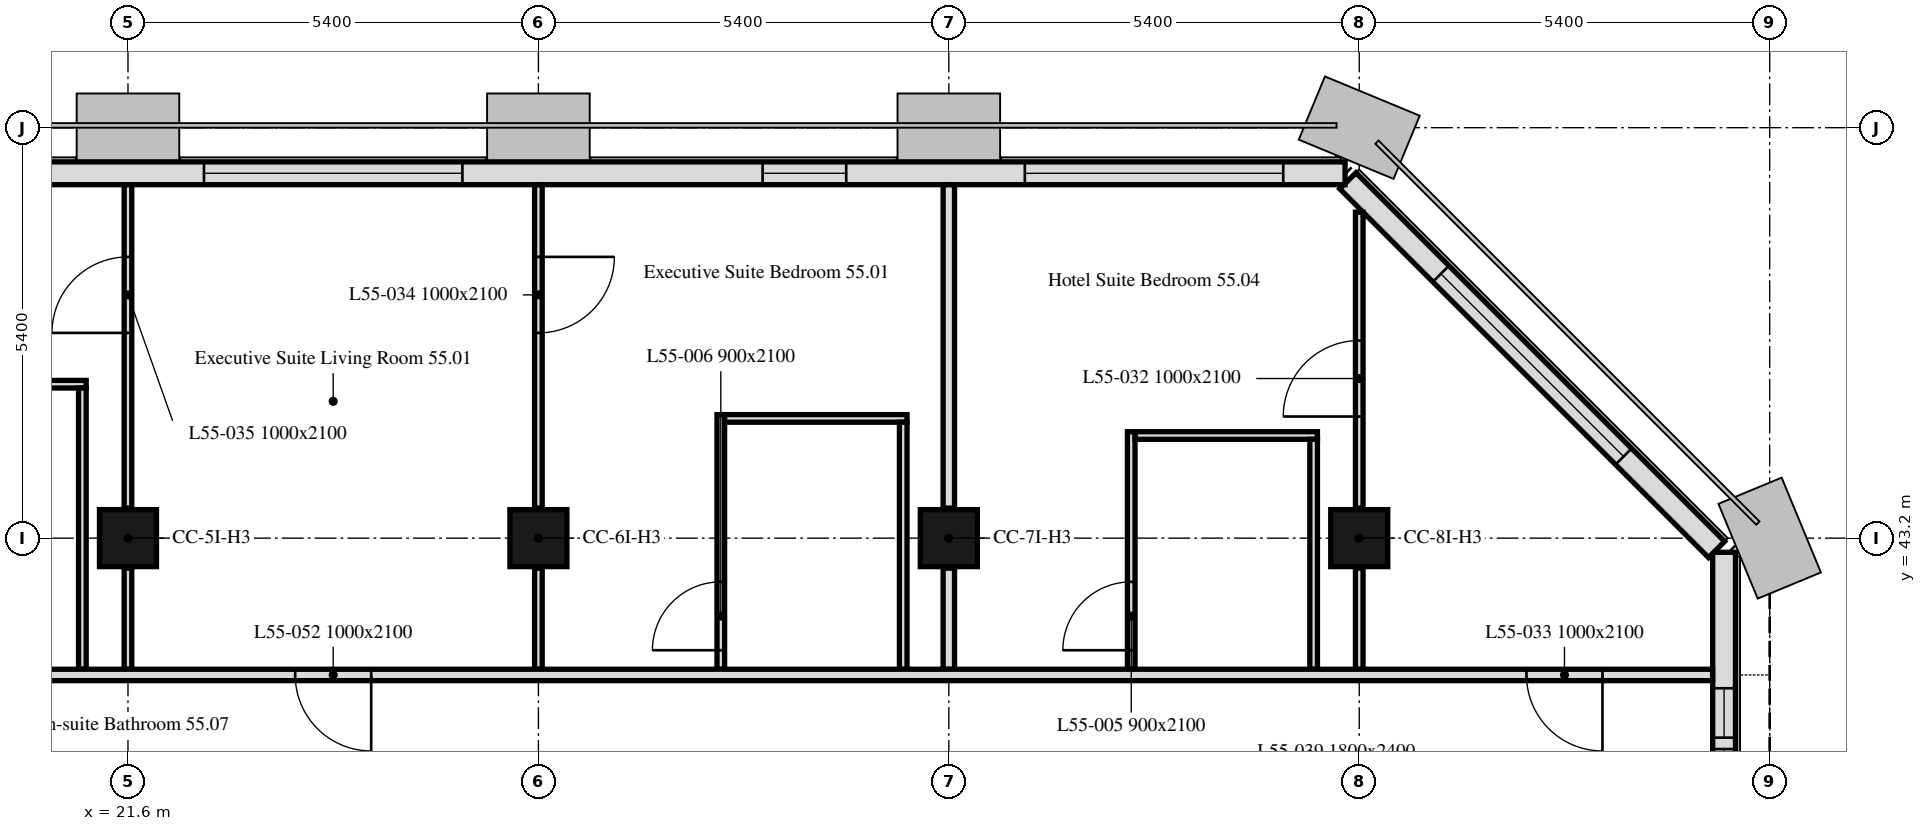
"""IFC4 building model, lengths in metres.
Left out: names, types, materials, properties, quantities, classifications, styles, units other than length and angle.
Written with IfcOpenShell. Run it as: python <this file> out.ifc"""

import sys

from ifc_helpers import new_model, si_unit, direction, frame, frame_2d, origin, origin_2d, place, context, subcontext, project, spatial, rectangle, extrude, element, fill, save


model = new_model("IFC4")
c1 = context("Model", 3, precision=1e-05, world=origin(), true_north=direction((0.0, 1.0)))
c2 = subcontext(c1, "Body", "Model", "MODEL_VIEW")
j1 = project(units=[si_unit("LENGTHUNIT", "METRE"), si_unit("PLANEANGLEUNIT", "RADIAN")], contexts=[c1])
p1 = place(None, origin())
s1 = spatial("IfcSite", under=j1, at=p1, CompositionType="ELEMENT")
p2 = place(p1, origin())
s2 = spatial("IfcBuilding", under=s1, at=p2, CompositionType="ELEMENT")
p3 = place(p2, frame((0.0, 0.0, 220.3)))
s3 = spatial("IfcBuildingStorey", under=s2, at=p3, CompositionType="ELEMENT", Elevation=220.3)
for number, where, z_axis, x_axis in (
    (1, (21.6, 43.2, 0.0), (0.0, 0.0, 1.0), (1.0, 0.0, 0.0)),
    (2, (27.0, 43.2, 0.0), (0.0, 0.0, 1.0), (1.0, 0.0, 0.0)),
    (3, (32.4, 43.2, 0.0), (0.0, 0.0, 1.0), (1.0, 0.0, 0.0)),
    (4, (37.8, 43.2, 0.0), (0.0, 0.0, 1.0), (1.0, 0.0, 0.0)),
):
    element("IfcColumn", number, at=place(p3, frame(where, z_axis=z_axis, x_axis=x_axis)), inside=s3, PredefinedType="COLUMN", context=c2, shape_type="SweptSolid", body=[
        extrude(rectangle(XDim=0.75, YDim=0.75, at=origin_2d()), origin(), (0.0, 0.0, 1.0), 3.0),
    ])
p4 = place(p3, frame((42.6, 32.4, 0.0), z_axis=(0.0, 0.0, 1.0), x_axis=(0.0, 1.0, 0.0)))
e5 = element("IfcWall", 5, at=p4, inside=s3, PredefinedType="SOLIDWALL", context=c2, shape_type="SweptSolid", body=[
    extrude(rectangle(XDim=10.614, YDim=0.3, at=frame_2d((5.307, 0.0))), origin(), (0.0, 0.0, 1.0), 3.0),
])
p5 = place(p4, frame((1.0, 0.0, 0.9)))
e6 = element("IfcOpeningElement", 6, at=p5, cuts=e5, PredefinedType="OPENING", context=c2, shape_type="SweptSolid", body=[
    extrude(rectangle(XDim=3.4, YDim=1.7, at=frame_2d((1.7, 0.85))), frame((0.0, 0.16, 0.0), z_axis=(0.0, -1.0, 0.0), x_axis=(1.0, 0.0, 0.0)), (0.0, 0.0, 1.0), 0.32),
])
p6 = place(p4, frame((7.375, 0.0, 0.9)))
e7 = element("IfcOpeningElement", 7, at=p6, cuts=e5, PredefinedType="OPENING", context=c2, shape_type="SweptSolid", body=[
    extrude(rectangle(XDim=0.65, YDim=1.7, at=frame_2d((0.325, 0.85))), frame((0.0, 0.16, 0.0), z_axis=(0.0, -1.0, 0.0), x_axis=(1.0, 0.0, 0.0)), (0.0, 0.0, 1.0), 0.32),
])
p7 = place(p4, frame((8.175, 0.0, 0.9)))
e8 = element("IfcOpeningElement", 8, at=p7, cuts=e5, PredefinedType="OPENING", context=c2, shape_type="SweptSolid", body=[
    extrude(rectangle(XDim=0.65, YDim=1.7, at=frame_2d((0.325, 0.85))), frame((0.0, 0.16, 0.0), z_axis=(0.0, -1.0, 0.0), x_axis=(1.0, 0.0, 0.0)), (0.0, 0.0, 1.0), 0.32),
])
p8 = place(p3, frame((42.501, 43.051, 0.0), z_axis=(0.0, 0.0, 1.0), x_axis=(-0.707106781187, 0.707106781187, 0.0)))
e9 = element("IfcWall", 9, at=p8, inside=s3, PredefinedType="SOLIDWALL", context=c2, shape_type="SweptSolid", body=[
    extrude(rectangle(XDim=6.86, YDim=0.3, at=frame_2d((3.43, 0.0))), origin(), (0.0, 0.0, 1.0), 3.0),
])
p9 = place(p8, frame((1.73, 0.0, 0.9)))
e10 = element("IfcOpeningElement", 10, at=p9, cuts=e9, PredefinedType="OPENING", context=c2, shape_type="SweptSolid", body=[
    extrude(rectangle(XDim=3.4, YDim=1.7, at=frame_2d((1.7, 0.85))), frame((0.0, 0.16, 0.0), z_axis=(0.0, -1.0, 0.0), x_axis=(1.0, 0.0, 0.0)), (0.0, 0.0, 1.0), 0.32),
])
p10 = place(p3, frame((37.614, 48.0, 0.0), z_axis=(0.0, 0.0, 1.0), x_axis=(-1.0, 0.0, 0.0)))
e11 = element("IfcWall", 11, at=p10, inside=s3, PredefinedType="SOLIDWALL", context=c2, shape_type="SweptSolid", body=[
    extrude(rectangle(XDim=32.027, YDim=0.3, at=frame_2d((16.014, 0.0))), origin(), (0.0, 0.0, 1.0), 3.0),
])
p11 = place(p10, frame((0.814, 0.0, 0.9)))
e12 = element("IfcOpeningElement", 12, at=p11, cuts=e11, PredefinedType="OPENING", context=c2, shape_type="SweptSolid", body=[
    extrude(rectangle(XDim=3.4, YDim=1.7, at=frame_2d((1.7, 0.85))), frame((0.0, 0.16, 0.0), z_axis=(0.0, -1.0, 0.0), x_axis=(1.0, 0.0, 0.0)), (0.0, 0.0, 1.0), 0.32),
])
p12 = place(p10, frame((6.564, 0.0, 0.9)))
e13 = element("IfcOpeningElement", 13, at=p12, cuts=e11, PredefinedType="OPENING", context=c2, shape_type="SweptSolid", body=[
    extrude(rectangle(XDim=1.1, YDim=1.7, at=frame_2d((0.55, 0.85))), frame((0.0, 0.16, 0.0), z_axis=(0.0, -1.0, 0.0), x_axis=(1.0, 0.0, 0.0)), (0.0, 0.0, 1.0), 0.32),
])
p13 = place(p10, frame((11.614, 0.0, 0.9)))
e14 = element("IfcOpeningElement", 14, at=p13, cuts=e11, PredefinedType="OPENING", context=c2, shape_type="SweptSolid", body=[
    extrude(rectangle(XDim=3.4, YDim=1.7, at=frame_2d((1.7, 0.85))), frame((0.0, 0.16, 0.0), z_axis=(0.0, -1.0, 0.0), x_axis=(1.0, 0.0, 0.0)), (0.0, 0.0, 1.0), 0.32),
])
p14 = place(p10, frame((17.364, 0.0, 0.9)))
e15 = element("IfcOpeningElement", 15, at=p14, cuts=e11, PredefinedType="OPENING", context=c2, shape_type="SweptSolid", body=[
    extrude(rectangle(XDim=1.1, YDim=1.7, at=frame_2d((0.55, 0.85))), frame((0.0, 0.16, 0.0), z_axis=(0.0, -1.0, 0.0), x_axis=(1.0, 0.0, 0.0)), (0.0, 0.0, 1.0), 0.32),
])
p15 = place(p10, frame((22.414, 0.0, 0.9)))
e16 = element("IfcOpeningElement", 16, at=p15, cuts=e11, PredefinedType="OPENING", context=c2, shape_type="SweptSolid", body=[
    extrude(rectangle(XDim=3.4, YDim=1.7, at=frame_2d((1.7, 0.85))), frame((0.0, 0.16, 0.0), z_axis=(0.0, -1.0, 0.0), x_axis=(1.0, 0.0, 0.0)), (0.0, 0.0, 1.0), 0.32),
])
p16 = place(p10, frame((28.164, 0.0, 0.9)))
e17 = element("IfcOpeningElement", 17, at=p16, cuts=e11, PredefinedType="OPENING", context=c2, shape_type="SweptSolid", body=[
    extrude(rectangle(XDim=1.1, YDim=1.7, at=frame_2d((0.55, 0.85))), frame((0.0, 0.16, 0.0), z_axis=(0.0, -1.0, 0.0), x_axis=(1.0, 0.0, 0.0)), (0.0, 0.0, 1.0), 0.32),
])
p17 = place(p3, frame((32.4, 47.849, 0.0), z_axis=(0.0, 0.0, 1.0), x_axis=(0.0, -1.0, 0.0)))
e18 = element("IfcWall", 18, at=p17, inside=s3, PredefinedType="PARTITIONING", context=c2, shape_type="SweptSolid", body=[
    extrude(rectangle(XDim=4.254, YDim=0.15, at=frame_2d((2.127, 0.0))), origin(), (0.0, 0.0, 1.0), 2.4),
])
p18 = place(p3, frame((32.4, 42.805, 0.0), z_axis=(0.0, 0.0, 1.0), x_axis=(0.0, -1.0, 0.0)))
e19 = element("IfcWall", 19, at=p18, inside=s3, PredefinedType="PARTITIONING", context=c2, shape_type="SweptSolid", body=[
    extrude(rectangle(XDim=1.33, YDim=0.15, at=frame_2d((0.665, 0.0))), origin(), (0.0, 0.0, 1.0), 2.4),
])
p19 = place(p3, frame((34.8, 41.475, 0.0), z_axis=(0.0, 0.0, 1.0), x_axis=(0.0, 1.0, 0.0)))
e20 = element("IfcWall", 20, at=p19, inside=s3, PredefinedType="PARTITIONING", context=c2, shape_type="SweptSolid", body=[
    extrude(rectangle(XDim=3.125, YDim=0.1, at=frame_2d((1.562, 0.0))), origin(), (0.0, 0.0, 1.0), 3.0),
])
p20 = place(p19, frame((0.25, 0.0, 0.0)))
e21 = element("IfcOpeningElement", 21, at=p20, cuts=e20, PredefinedType="OPENING", context=c2, shape_type="SweptSolid", body=[
    extrude(rectangle(XDim=0.9, YDim=2.1, at=frame_2d((0.45, 1.05))), frame((0.0, 0.05, 0.0), z_axis=(0.0, -1.0, 0.0), x_axis=(1.0, 0.0, 0.0)), (0.0, 0.0, 1.0), 0.1),
])
p21 = place(p3, frame((34.85, 44.55, 0.0), z_axis=(0.0, 0.0, 1.0), x_axis=(1.0, 0.0, 0.0)))
e22 = element("IfcWall", 22, at=p21, inside=s3, PredefinedType="PARTITIONING", context=c2, shape_type="SweptSolid", body=[
    extrude(rectangle(XDim=2.4, YDim=0.1, at=frame_2d((1.2, 0.0))), origin(), (0.0, 0.0, 1.0), 3.0),
])
p22 = place(p3, frame((37.2, 44.5, 0.0), z_axis=(0.0, 0.0, 1.0), x_axis=(0.0, -1.0, 0.0)))
e23 = element("IfcWall", 23, at=p22, inside=s3, PredefinedType="PARTITIONING", context=c2, shape_type="SweptSolid", body=[
    extrude(rectangle(XDim=3.025, YDim=0.1, at=frame_2d((1.512, 0.0))), origin(), (0.0, 0.0, 1.0), 3.0),
])
p23 = place(p3, frame((37.8, 41.475, 0.0), z_axis=(0.0, 0.0, 1.0), x_axis=(0.0, 1.0, 0.0)))
e24 = element("IfcWall", 24, at=p23, inside=s3, PredefinedType="PARTITIONING", context=c2, shape_type="SweptSolid", body=[
    extrude(rectangle(XDim=1.33, YDim=0.1, at=frame_2d((0.665, 0.0))), origin(), (0.0, 0.0, 1.0), 3.0),
])
p24 = place(p3, frame((37.8, 43.595, 0.0), z_axis=(0.0, 0.0, 1.0), x_axis=(0.0, 1.0, 0.0)))
e25 = element("IfcWall", 25, at=p24, inside=s3, PredefinedType="PARTITIONING", context=c2, shape_type="SweptSolid", body=[
    extrude(rectangle(XDim=3.893, YDim=0.1, at=frame_2d((1.946, 0.0))), origin(), (0.0, 0.0, 1.0), 3.0),
])
p25 = place(p24, frame((1.205, 0.0, 0.0)))
e26 = element("IfcOpeningElement", 26, at=p25, cuts=e25, PredefinedType="OPENING", context=c2, shape_type="SweptSolid", body=[
    extrude(rectangle(XDim=1.0, YDim=2.1, at=frame_2d((0.5, 1.05))), frame((0.0, 0.05, 0.0), z_axis=(0.0, -1.0, 0.0), x_axis=(1.0, 0.0, 0.0)), (0.0, 0.0, 1.0), 0.1),
])
p26 = place(p3, frame((27.0, 47.849, 0.0), z_axis=(0.0, 0.0, 1.0), x_axis=(0.0, -1.0, 0.0)))
e27 = element("IfcWall", 27, at=p26, inside=s3, PredefinedType="PARTITIONING", context=c2, shape_type="SweptSolid", body=[
    extrude(rectangle(XDim=4.254, YDim=0.1, at=frame_2d((2.127, 0.0))), origin(), (0.0, 0.0, 1.0), 2.4),
])
p27 = place(p26, frame((0.949, 0.0, 0.0)))
e28 = element("IfcOpeningElement", 28, at=p27, cuts=e27, PredefinedType="OPENING", context=c2, shape_type="SweptSolid", body=[
    extrude(rectangle(XDim=1.0, YDim=2.1, at=frame_2d((0.5, 1.05))), frame((0.0, 0.05, 0.0), z_axis=(0.0, -1.0, 0.0), x_axis=(1.0, 0.0, 0.0)), (0.0, 0.0, 1.0), 0.1),
])
p28 = place(p3, frame((27.0, 42.805, 0.0), z_axis=(0.0, 0.0, 1.0), x_axis=(0.0, -1.0, 0.0)))
e29 = element("IfcWall", 29, at=p28, inside=s3, PredefinedType="PARTITIONING", context=c2, shape_type="SweptSolid", body=[
    extrude(rectangle(XDim=1.33, YDim=0.1, at=frame_2d((0.665, 0.0))), origin(), (0.0, 0.0, 1.0), 2.4),
])
p29 = place(p3, frame((29.4, 41.475, 0.0), z_axis=(0.0, 0.0, 1.0), x_axis=(0.0, 1.0, 0.0)))
e30 = element("IfcWall", 30, at=p29, inside=s3, PredefinedType="PARTITIONING", context=c2, shape_type="SweptSolid", body=[
    extrude(rectangle(XDim=3.35, YDim=0.1, at=frame_2d((1.675, 0.0))), origin(), (0.0, 0.0, 1.0), 3.0),
])
p30 = place(p29, frame((0.25, 0.0, 0.0)))
e31 = element("IfcOpeningElement", 31, at=p30, cuts=e30, PredefinedType="OPENING", context=c2, shape_type="SweptSolid", body=[
    extrude(rectangle(XDim=0.9, YDim=2.1, at=frame_2d((0.45, 1.05))), frame((0.0, 0.05, 0.0), z_axis=(0.0, -1.0, 0.0), x_axis=(1.0, 0.0, 0.0)), (0.0, 0.0, 1.0), 0.1),
])
p31 = place(p3, frame((29.45, 44.775, 0.0), z_axis=(0.0, 0.0, 1.0), x_axis=(1.0, 0.0, 0.0)))
e32 = element("IfcWall", 32, at=p31, inside=s3, PredefinedType="PARTITIONING", context=c2, shape_type="SweptSolid", body=[
    extrude(rectangle(XDim=2.4, YDim=0.1, at=frame_2d((1.2, 0.0))), origin(), (0.0, 0.0, 1.0), 3.0),
])
p32 = place(p3, frame((31.8, 44.725, 0.0), z_axis=(0.0, 0.0, 1.0), x_axis=(0.0, -1.0, 0.0)))
e33 = element("IfcWall", 33, at=p32, inside=s3, PredefinedType="PARTITIONING", context=c2, shape_type="SweptSolid", body=[
    extrude(rectangle(XDim=3.25, YDim=0.1, at=frame_2d((1.625, 0.0))), origin(), (0.0, 0.0, 1.0), 3.0),
])
p33 = place(p3, frame((18.65, 45.225, 0.0), z_axis=(0.0, 0.0, 1.0), x_axis=(1.0, 0.0, 0.0)))
e34 = element("IfcWall", 34, at=p33, inside=s3, PredefinedType="PARTITIONING", context=c2, shape_type="SweptSolid", body=[
    extrude(rectangle(XDim=2.4, YDim=0.1, at=frame_2d((1.2, 0.0))), origin(), (0.0, 0.0, 1.0), 3.0),
])
p34 = place(p3, frame((21.0, 45.175, 0.0), z_axis=(0.0, 0.0, 1.0), x_axis=(0.0, -1.0, 0.0)))
e35 = element("IfcWall", 35, at=p34, inside=s3, PredefinedType="PARTITIONING", context=c2, shape_type="SweptSolid", body=[
    extrude(rectangle(XDim=3.7, YDim=0.1, at=frame_2d((1.85, 0.0))), origin(), (0.0, 0.0, 1.0), 3.0),
])
p35 = place(p3, frame((21.6, 41.475, 0.0), z_axis=(0.0, 0.0, 1.0), x_axis=(0.0, 1.0, 0.0)))
e36 = element("IfcWall", 36, at=p35, inside=s3, PredefinedType="PARTITIONING", context=c2, shape_type="SweptSolid", body=[
    extrude(rectangle(XDim=1.33, YDim=0.1, at=frame_2d((0.665, 0.0))), origin(), (0.0, 0.0, 1.0), 2.4),
])
p36 = place(p3, frame((21.6, 43.595, 0.0), z_axis=(0.0, 0.0, 1.0), x_axis=(0.0, 1.0, 0.0)))
e37 = element("IfcWall", 37, at=p36, inside=s3, PredefinedType="PARTITIONING", context=c2, shape_type="SweptSolid", body=[
    extrude(rectangle(XDim=4.254, YDim=0.1, at=frame_2d((2.127, 0.0))), origin(), (0.0, 0.0, 1.0), 2.4),
])
p37 = place(p36, frame((2.305, 0.0, 0.0)))
e38 = element("IfcOpeningElement", 38, at=p37, cuts=e37, PredefinedType="OPENING", context=c2, shape_type="SweptSolid", body=[
    extrude(rectangle(XDim=1.0, YDim=2.1, at=frame_2d((0.5, 1.05))), frame((0.0, 0.05, 0.0), z_axis=(0.0, -1.0, 0.0), x_axis=(1.0, 0.0, 0.0)), (0.0, 0.0, 1.0), 0.1),
])
p38 = place(p3, frame((42.449, 41.4, 0.0), z_axis=(0.0, 0.0, 1.0), x_axis=(-1.0, 0.0, 0.0)))
e39 = element("IfcWall", 39, at=p38, inside=s3, PredefinedType="PARTITIONING", context=c2, shape_type="SweptSolid", body=[
    extrude(rectangle(XDim=41.698, YDim=0.15, at=frame_2d((20.849, 0.0))), origin(), (0.0, 0.0, 1.0), 2.4),
])
p39 = place(p38, frame((1.449, 0.0, 0.0)))
e40 = element("IfcOpeningElement", 40, at=p39, cuts=e39, PredefinedType="OPENING", context=c2, shape_type="SweptSolid", body=[
    extrude(rectangle(XDim=1.0, YDim=2.1, at=frame_2d((0.5, 1.05))), frame((0.0, 0.075, 0.0), z_axis=(0.0, -1.0, 0.0), x_axis=(1.0, 0.0, 0.0)), (0.0, 0.0, 1.0), 0.15),
])
p40 = place(p38, frame((29.249, 0.0, 0.0)))
e41 = element("IfcOpeningElement", 41, at=p40, cuts=e39, PredefinedType="OPENING", context=c2, shape_type="SweptSolid", body=[
    extrude(rectangle(XDim=1.0, YDim=2.1, at=frame_2d((0.5, 1.05))), frame((0.0, 0.075, 0.0), z_axis=(0.0, -1.0, 0.0), x_axis=(1.0, 0.0, 0.0)), (0.0, 0.0, 1.0), 0.15),
])
p41 = place(p38, frame((37.599, 0.0, 0.0)))
e42 = element("IfcOpeningElement", 42, at=p41, cuts=e39, PredefinedType="OPENING", context=c2, shape_type="SweptSolid", body=[
    extrude(rectangle(XDim=1.0, YDim=2.1, at=frame_2d((0.5, 1.05))), frame((0.0, 0.075, 0.0), z_axis=(0.0, -1.0, 0.0), x_axis=(1.0, 0.0, 0.0)), (0.0, 0.0, 1.0), 0.15),
])
p42 = place(p38, frame((17.649, 0.0, 0.0)))
e43 = element("IfcOpeningElement", 43, at=p42, cuts=e39, PredefinedType="OPENING", context=c2, shape_type="SweptSolid", body=[
    extrude(rectangle(XDim=1.0, YDim=2.1, at=frame_2d((0.5, 1.05))), frame((0.0, 0.075, 0.0), z_axis=(0.0, -1.0, 0.0), x_axis=(1.0, 0.0, 0.0)), (0.0, 0.0, 1.0), 0.15),
])
p43 = place(p6, origin())
e44 = element("IfcWindow", 44, at=p43, inside=s3, PartitioningType="SINGLE_PANEL", PredefinedType="WINDOW", context=c2, shape_type="SweptSolid", body=[
    extrude(rectangle(XDim=0.65, YDim=1.7, at=frame_2d((0.325, 0.85))), frame((0.0, 0.03, 0.0), z_axis=(0.0, -1.0, 0.0), x_axis=(1.0, 0.0, 0.0)), (0.0, 0.0, 1.0), 0.06),
])
fill(e7, e44)
p44 = place(p7, origin())
e45 = element("IfcWindow", 45, at=p44, inside=s3, PartitioningType="SINGLE_PANEL", PredefinedType="WINDOW", context=c2, shape_type="SweptSolid", body=[
    extrude(rectangle(XDim=0.65, YDim=1.7, at=frame_2d((0.325, 0.85))), frame((0.0, 0.03, 0.0), z_axis=(0.0, -1.0, 0.0), x_axis=(1.0, 0.0, 0.0)), (0.0, 0.0, 1.0), 0.06),
])
fill(e8, e45)
p45 = place(p9, origin())
e46 = element("IfcWindow", 46, at=p45, inside=s3, PartitioningType="SINGLE_PANEL", PredefinedType="WINDOW", context=c2, shape_type="SweptSolid", body=[
    extrude(rectangle(XDim=3.4, YDim=1.7, at=frame_2d((1.7, 0.85))), frame((0.0, 0.03, 0.0), z_axis=(0.0, -1.0, 0.0), x_axis=(1.0, 0.0, 0.0)), (0.0, 0.0, 1.0), 0.06),
])
fill(e10, e46)
p46 = place(p11, origin())
e47 = element("IfcWindow", 47, at=p46, inside=s3, PartitioningType="SINGLE_PANEL", PredefinedType="WINDOW", context=c2, shape_type="SweptSolid", body=[
    extrude(rectangle(XDim=3.4, YDim=1.7, at=frame_2d((1.7, 0.85))), frame((0.0, 0.03, 0.0), z_axis=(0.0, -1.0, 0.0), x_axis=(1.0, 0.0, 0.0)), (0.0, 0.0, 1.0), 0.06),
])
fill(e12, e47)
p47 = place(p12, origin())
e48 = element("IfcWindow", 48, at=p47, inside=s3, PartitioningType="SINGLE_PANEL", PredefinedType="WINDOW", context=c2, shape_type="SweptSolid", body=[
    extrude(rectangle(XDim=1.1, YDim=1.7, at=frame_2d((0.55, 0.85))), frame((0.0, 0.03, 0.0), z_axis=(0.0, -1.0, 0.0), x_axis=(1.0, 0.0, 0.0)), (0.0, 0.0, 1.0), 0.06),
])
fill(e13, e48)
p48 = place(p13, origin())
e49 = element("IfcWindow", 49, at=p48, inside=s3, PartitioningType="SINGLE_PANEL", PredefinedType="WINDOW", context=c2, shape_type="SweptSolid", body=[
    extrude(rectangle(XDim=3.4, YDim=1.7, at=frame_2d((1.7, 0.85))), frame((0.0, 0.03, 0.0), z_axis=(0.0, -1.0, 0.0), x_axis=(1.0, 0.0, 0.0)), (0.0, 0.0, 1.0), 0.06),
])
fill(e14, e49)
p49 = place(p20, origin())
e50 = element("IfcDoor", 50, at=p49, inside=s3, OperationType="SINGLE_SWING_LEFT", PredefinedType="DOOR", context=c2, shape_type="SweptSolid", body=[
    extrude(rectangle(XDim=0.9, YDim=2.1, at=frame_2d((0.45, 1.05))), frame((0.0, 0.025, 0.0), z_axis=(0.0, -1.0, 0.0), x_axis=(1.0, 0.0, 0.0)), (0.0, 0.0, 1.0), 0.05),
])
fill(e21, e50)
p50 = place(p30, origin())
e51 = element("IfcDoor", 51, at=p50, inside=s3, OperationType="SINGLE_SWING_LEFT", PredefinedType="DOOR", context=c2, shape_type="SweptSolid", body=[
    extrude(rectangle(XDim=0.9, YDim=2.1, at=frame_2d((0.45, 1.05))), frame((0.0, 0.025, 0.0), z_axis=(0.0, -1.0, 0.0), x_axis=(1.0, 0.0, 0.0)), (0.0, 0.0, 1.0), 0.05),
])
fill(e31, e51)
p51 = place(p25, origin())
e52 = element("IfcDoor", 52, at=p51, inside=s3, OperationType="SINGLE_SWING_LEFT", PredefinedType="DOOR", context=c2, shape_type="SweptSolid", body=[
    extrude(rectangle(XDim=1.0, YDim=2.1, at=frame_2d((0.5, 1.05))), frame((0.0, 0.025, 0.0), z_axis=(0.0, -1.0, 0.0), x_axis=(1.0, 0.0, 0.0)), (0.0, 0.0, 1.0), 0.05),
])
fill(e26, e52)
p52 = place(p39, origin())
e53 = element("IfcDoor", 53, at=p52, inside=s3, OperationType="SINGLE_SWING_RIGHT", PredefinedType="DOOR", context=c2, shape_type="SweptSolid", body=[
    extrude(rectangle(XDim=1.0, YDim=2.1, at=frame_2d((0.5, 1.05))), frame((0.0, 0.025, 0.0), z_axis=(0.0, -1.0, 0.0), x_axis=(1.0, 0.0, 0.0)), (0.0, 0.0, 1.0), 0.05),
])
fill(e40, e53)
p53 = place(p27, origin())
e54 = element("IfcDoor", 54, at=p53, inside=s3, OperationType="SINGLE_SWING_LEFT", PredefinedType="DOOR", context=c2, shape_type="SweptSolid", body=[
    extrude(rectangle(XDim=1.0, YDim=2.1, at=frame_2d((0.5, 1.05))), frame((0.0, 0.025, 0.0), z_axis=(0.0, -1.0, 0.0), x_axis=(1.0, 0.0, 0.0)), (0.0, 0.0, 1.0), 0.05),
])
fill(e28, e54)
p54 = place(p37, origin())
e55 = element("IfcDoor", 55, at=p54, inside=s3, OperationType="SINGLE_SWING_LEFT", PredefinedType="DOOR", context=c2, shape_type="SweptSolid", body=[
    extrude(rectangle(XDim=1.0, YDim=2.1, at=frame_2d((0.5, 1.05))), frame((0.0, 0.025, 0.0), z_axis=(0.0, -1.0, 0.0), x_axis=(1.0, 0.0, 0.0)), (0.0, 0.0, 1.0), 0.05),
])
fill(e38, e55)
p55 = place(p42, origin())
e56 = element("IfcDoor", 56, at=p55, inside=s3, OperationType="SINGLE_SWING_LEFT", PredefinedType="DOOR", context=c2, shape_type="SweptSolid", body=[
    extrude(rectangle(XDim=1.0, YDim=2.1, at=frame_2d((0.5, 1.05))), frame((0.0, 0.025, 0.0), z_axis=(0.0, -1.0, 0.0), x_axis=(1.0, 0.0, 0.0)), (0.0, 0.0, 1.0), 0.05),
])
fill(e43, e56)
save(model, sys.argv[1])
